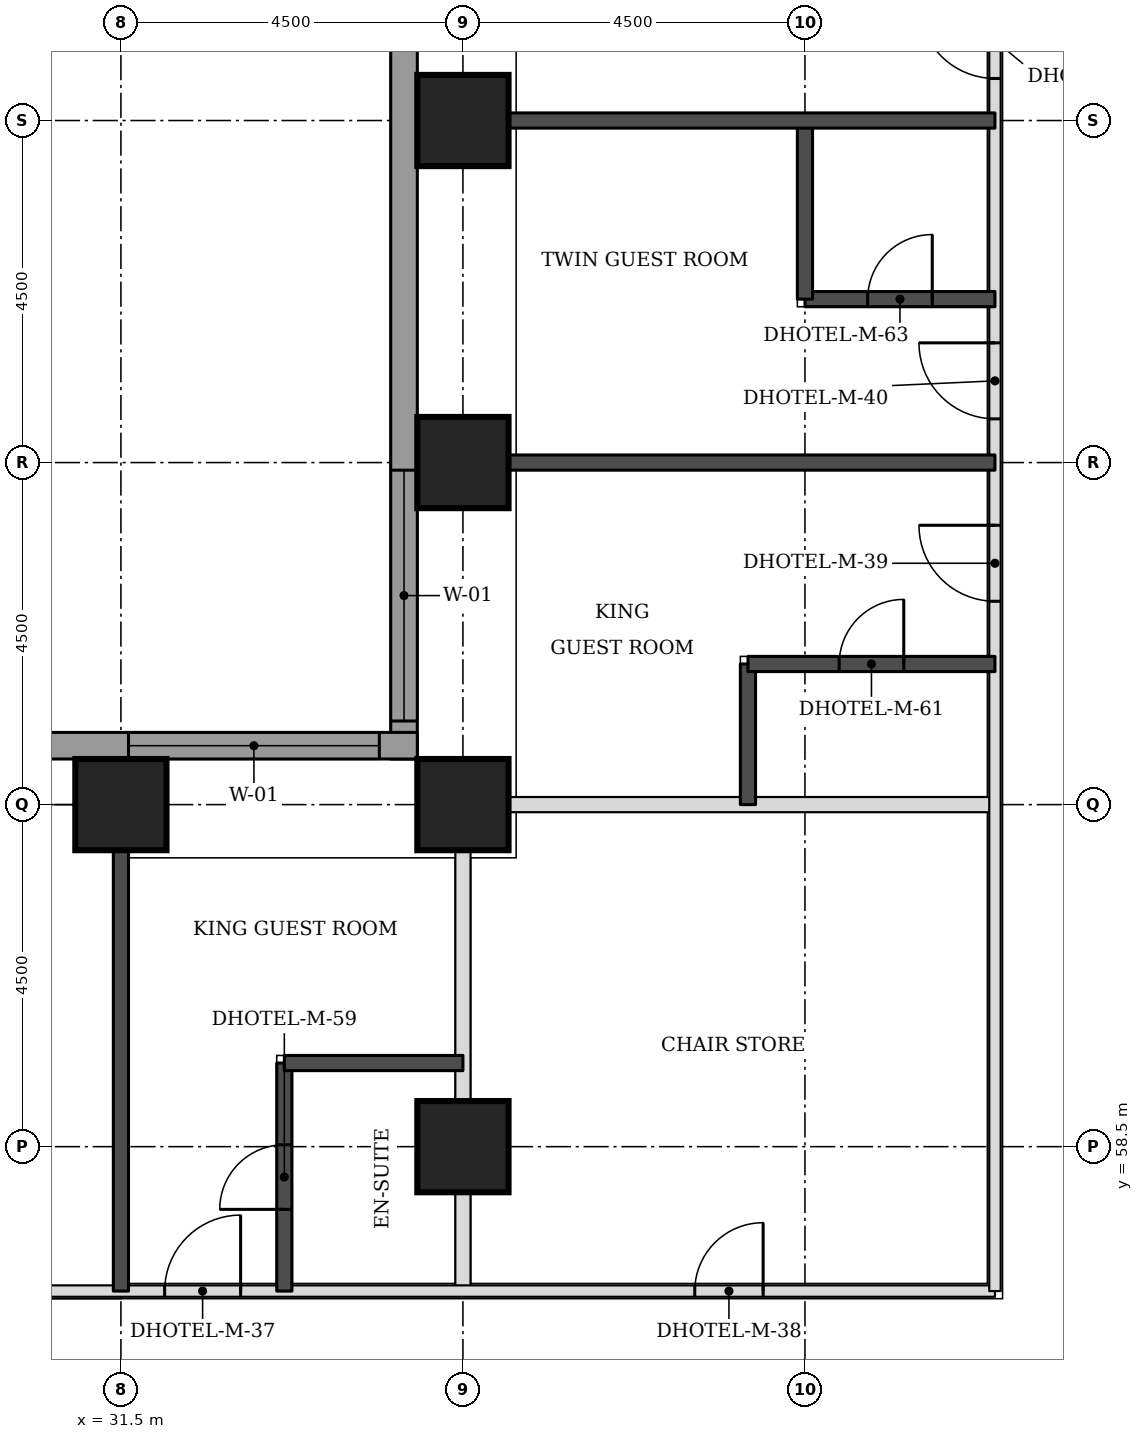
"""IFC4 building model, lengths in metres.
Left out: names, types, materials, properties, quantities, classifications, styles, units other than length and angle.
Written with IfcOpenShell. Run it as: python <this file> out.ifc"""

import sys

from ifc_helpers import new_model, si_unit, direction, frame, frame_2d, origin, origin_2d, place, context, subcontext, project, spatial, rectangle, extrude, element, fill, save


model = new_model("IFC4")
c1 = context("Model", 3, precision=1e-05, world=origin(), true_north=direction((0.0, 1.0)))
c2 = subcontext(c1, "Body", "Model", "MODEL_VIEW")
j1 = project(units=[si_unit("LENGTHUNIT", "METRE"), si_unit("PLANEANGLEUNIT", "RADIAN")], contexts=[c1])
p1 = place(None, origin())
s1 = spatial("IfcSite", under=j1, at=p1, CompositionType="ELEMENT")
p2 = place(p1, origin())
s2 = spatial("IfcBuilding", under=s1, at=p2, CompositionType="ELEMENT")
p3 = place(p2, frame((0.0, 0.0, 23.1)))
s3 = spatial("IfcBuildingStorey", under=s2, at=p3, CompositionType="ELEMENT", Elevation=23.1)
for number, where, z_axis, x_axis in (
    (1, (36.0, 58.5, 0.0), (0.0, 0.0, 1.0), (1.0, 0.0, 0.0)),
    (2, (31.5, 63.0, 0.0), (0.0, 0.0, 1.0), (1.0, 0.0, 0.0)),
    (3, (36.0, 63.0, 0.0), (0.0, 0.0, 1.0), (1.0, 0.0, 0.0)),
    (4, (36.0, 67.5, 0.0), (0.0, 0.0, 1.0), (1.0, 0.0, 0.0)),
    (5, (36.0, 72.0, 0.0), (0.0, 0.0, 1.0), (1.0, 0.0, 0.0)),
):
    element("IfcColumn", number, at=place(p3, frame(where, z_axis=z_axis, x_axis=x_axis)), inside=s3, PredefinedType="COLUMN", context=c2, shape_type="SweptSolid", body=[
        extrude(rectangle(XDim=1.2, YDim=1.2, at=origin_2d()), origin(), (0.0, 0.0, 1.0), 3.3),
    ])
p4 = place(p3, frame((35.225, 76.894, 0.0), z_axis=(0.0, 0.0, 1.0), x_axis=(0.0, -1.0, 0.0)))
e6 = element("IfcWall", 6, at=p4, inside=s3, PredefinedType="STANDARD", context=c2, shape_type="SweptSolid", body=[
    extrude(rectangle(XDim=13.293, YDim=0.35, at=frame_2d((6.647, 0.0))), origin(), (0.0, 0.0, 1.0), 3.055),
])
p5 = place(p4, frame((9.493, 0.0, 0.8)))
e7 = element("IfcOpeningElement", 7, at=p5, cuts=e6, PredefinedType="OPENING", context=c2, shape_type="SweptSolid", body=[
    extrude(rectangle(XDim=3.3, YDim=1.5, at=frame_2d((1.65, 0.75))), frame((0.0, 0.185, 0.0), z_axis=(0.0, -1.0, 0.0), x_axis=(1.0, 0.0, 0.0)), (0.0, 0.0, 1.0), 0.37),
])
p6 = place(p3, frame((35.4, 63.775, 0.0), z_axis=(0.0, 0.0, 1.0), x_axis=(-1.0, 0.0, 0.0)))
e8 = element("IfcWall", 8, at=p6, inside=s3, PredefinedType="STANDARD", context=c2, shape_type="SweptSolid", body=[
    extrude(rectangle(XDim=17.793, YDim=0.35, at=frame_2d((8.897, 0.0))), origin(), (0.0, 0.0, 1.0), 3.055),
])
p7 = place(p6, frame((0.5, 0.0, 0.8)))
e9 = element("IfcOpeningElement", 9, at=p7, cuts=e8, PredefinedType="OPENING", context=c2, shape_type="SweptSolid", body=[
    extrude(rectangle(XDim=3.3, YDim=1.5, at=frame_2d((1.65, 0.75))), frame((0.0, 0.185, 0.0), z_axis=(0.0, -1.0, 0.0), x_axis=(1.0, 0.0, 0.0)), (0.0, 0.0, 1.0), 0.37),
])
p8 = place(p6, frame((9.0, 0.0, 0.8)))
e10 = element("IfcOpeningElement", 10, at=p8, cuts=e8, PredefinedType="OPENING", context=c2, shape_type="SweptSolid", body=[
    extrude(rectangle(XDim=3.3, YDim=1.5, at=frame_2d((1.65, 0.75))), frame((0.0, 0.185, 0.0), z_axis=(0.0, -1.0, 0.0), x_axis=(1.0, 0.0, 0.0)), (0.0, 0.0, 1.0), 0.37),
])
p9 = place(p3, frame((36.0, 56.6, 0.0), z_axis=(0.0, 0.0, 1.0), x_axis=(0.0, 1.0, 0.0)))
e11 = element("IfcWall", 11, at=p9, inside=s3, PredefinedType="PARTITIONING", context=c2, shape_type="SweptSolid", body=[
    extrude(rectangle(XDim=5.8, YDim=0.2, at=frame_2d((2.9, 0.0))), origin(), (0.0, 0.0, 1.0), 2.33),
])
p10 = place(p3, frame((36.6, 63.0, 0.0), z_axis=(0.0, 0.0, 1.0), x_axis=(1.0, 0.0, 0.0)))
e12 = element("IfcWall", 12, at=p10, inside=s3, PredefinedType="PARTITIONING", context=c2, shape_type="SweptSolid", body=[
    extrude(rectangle(XDim=6.4, YDim=0.2, at=frame_2d((3.2, 0.0))), origin(), (0.0, 0.0, 1.0), 3.08),
])
p11 = place(p3, frame((29.38, 56.6, 0.0), z_axis=(0.0, 0.0, 1.0), x_axis=(1.0, 0.0, 0.0)))
e13 = element("IfcWall", 13, at=p11, inside=s3, PredefinedType="PARTITIONING", context=c2, shape_type="SweptSolid", body=[
    extrude(rectangle(XDim=13.62, YDim=0.15, at=frame_2d((6.81, 0.0))), origin(), (0.0, 0.0, 1.0), 3.08),
])
p12 = place(p11, frame((2.695, 0.0, 0.0)))
e14 = element("IfcOpeningElement", 14, at=p12, cuts=e13, PredefinedType="OPENING", context=c2, shape_type="SweptSolid", body=[
    extrude(rectangle(XDim=1.0, YDim=2.1, at=frame_2d((0.5, 1.05))), frame((0.0, 0.085, 0.0), z_axis=(0.0, -1.0, 0.0), x_axis=(1.0, 0.0, 0.0)), (0.0, 0.0, 1.0), 0.17),
])
p13 = place(p11, frame((9.67, 0.0, 0.0)))
e15 = element("IfcOpeningElement", 15, at=p13, cuts=e13, PredefinedType="OPENING", context=c2, shape_type="SweptSolid", body=[
    extrude(rectangle(XDim=0.9, YDim=2.1, at=frame_2d((0.45, 1.05))), frame((0.0, 0.085, 0.0), z_axis=(0.0, -1.0, 0.0), x_axis=(1.0, 0.0, 0.0)), (0.0, 0.0, 1.0), 0.17),
])
p14 = place(p3, frame((43.0, 56.6, 0.0), z_axis=(0.0, 0.0, 1.0), x_axis=(0.0, 1.0, 0.0)))
e16 = element("IfcWall", 16, at=p14, inside=s3, PredefinedType="PARTITIONING", context=c2, shape_type="SweptSolid", body=[
    extrude(rectangle(XDim=17.4, YDim=0.15, at=frame_2d((8.7, 0.0))), origin(), (0.0, 0.0, 1.0), 3.08),
])
p15 = place(p14, frame((9.075, 0.0, 0.0)))
e17 = element("IfcOpeningElement", 17, at=p15, cuts=e16, PredefinedType="OPENING", context=c2, shape_type="SweptSolid", body=[
    extrude(rectangle(XDim=1.0, YDim=2.1, at=frame_2d((0.5, 1.05))), frame((0.0, 0.085, 0.0), z_axis=(0.0, -1.0, 0.0), x_axis=(1.0, 0.0, 0.0)), (0.0, 0.0, 1.0), 0.17),
])
p16 = place(p14, frame((11.475, 0.0, 0.0)))
e18 = element("IfcOpeningElement", 18, at=p16, cuts=e16, PredefinedType="OPENING", context=c2, shape_type="SweptSolid", body=[
    extrude(rectangle(XDim=1.0, YDim=2.1, at=frame_2d((0.5, 1.05))), frame((0.0, 0.085, 0.0), z_axis=(0.0, -1.0, 0.0), x_axis=(1.0, 0.0, 0.0)), (0.0, 0.0, 1.0), 0.17),
])
p17 = place(p14, frame((15.953, 0.0, 0.0)))
e19 = element("IfcOpeningElement", 19, at=p17, cuts=e16, PredefinedType="OPENING", context=c2, shape_type="SweptSolid", body=[
    extrude(rectangle(XDim=1.0, YDim=2.1, at=frame_2d((0.5, 1.05))), frame((0.0, 0.085, 0.0), z_axis=(0.0, -1.0, 0.0), x_axis=(1.0, 0.0, 0.0)), (0.0, 0.0, 1.0), 0.17),
])
p18 = place(p3, frame((31.5, 56.6, 0.0), z_axis=(0.0, 0.0, 1.0), x_axis=(0.0, 1.0, 0.0)))
e20 = element("IfcWall", 20, at=p18, inside=s3, PredefinedType="SOLIDWALL", context=c2, shape_type="SweptSolid", body=[
    extrude(rectangle(XDim=5.8, YDim=0.2, at=frame_2d((2.9, 0.0))), origin(), (0.0, 0.0, 1.0), 3.08),
])
p19 = place(p3, frame((33.65, 56.6, 0.0), z_axis=(0.0, 0.0, 1.0), x_axis=(0.0, 1.0, 0.0)))
e21 = element("IfcWall", 21, at=p19, inside=s3, PredefinedType="SOLIDWALL", context=c2, shape_type="SweptSolid", body=[
    extrude(rectangle(XDim=3.0, YDim=0.2, at=frame_2d((1.5, 0.0))), origin(), (0.0, 0.0, 1.0), 3.08),
])
p20 = place(p19, frame((1.075, 0.0, 0.0)))
e22 = element("IfcOpeningElement", 22, at=p20, cuts=e21, PredefinedType="OPENING", context=c2, shape_type="SweptSolid", body=[
    extrude(rectangle(XDim=0.85, YDim=2.1, at=frame_2d((0.425, 1.05))), frame((0.0, 0.11, 0.0), z_axis=(0.0, -1.0, 0.0), x_axis=(1.0, 0.0, 0.0)), (0.0, 0.0, 1.0), 0.22),
])
p21 = place(p3, frame((33.65, 59.6, 0.0), z_axis=(0.0, 0.0, 1.0), x_axis=(1.0, 0.0, 0.0)))
e23 = element("IfcWall", 23, at=p21, inside=s3, PredefinedType="SOLIDWALL", context=c2, shape_type="SweptSolid", body=[
    extrude(rectangle(XDim=2.35, YDim=0.2, at=frame_2d((1.175, 0.0))), origin(), (0.0, 0.0, 1.0), 3.08),
])
p22 = place(p3, frame((39.75, 63.0, 0.0), z_axis=(0.0, 0.0, 1.0), x_axis=(0.0, 1.0, 0.0)))
e24 = element("IfcWall", 24, at=p22, inside=s3, PredefinedType="SOLIDWALL", context=c2, shape_type="SweptSolid", body=[
    extrude(rectangle(XDim=1.85, YDim=0.2, at=frame_2d((0.925, 0.0))), origin(), (0.0, 0.0, 1.0), 3.08),
])
p23 = place(p3, frame((39.75, 64.85, 0.0), z_axis=(0.0, 0.0, 1.0), x_axis=(1.0, 0.0, 0.0)))
e25 = element("IfcWall", 25, at=p23, inside=s3, PredefinedType="SOLIDWALL", context=c2, shape_type="SweptSolid", body=[
    extrude(rectangle(XDim=3.25, YDim=0.2, at=frame_2d((1.625, 0.0))), origin(), (0.0, 0.0, 1.0), 3.08),
])
p24 = place(p23, frame((1.2, 0.0, 0.0)))
e26 = element("IfcOpeningElement", 26, at=p24, cuts=e25, PredefinedType="OPENING", context=c2, shape_type="SweptSolid", body=[
    extrude(rectangle(XDim=0.85, YDim=2.1, at=frame_2d((0.425, 1.05))), frame((0.0, 0.11, 0.0), z_axis=(0.0, -1.0, 0.0), x_axis=(1.0, 0.0, 0.0)), (0.0, 0.0, 1.0), 0.22),
])
p25 = place(p3, frame((36.6, 67.5, 0.0), z_axis=(0.0, 0.0, 1.0), x_axis=(1.0, 0.0, 0.0)))
e27 = element("IfcWall", 27, at=p25, inside=s3, PredefinedType="SOLIDWALL", context=c2, shape_type="SweptSolid", body=[
    extrude(rectangle(XDim=6.4, YDim=0.2, at=frame_2d((3.2, 0.0))), origin(), (0.0, 0.0, 1.0), 3.08),
])
p26 = place(p3, frame((40.5, 69.65, 0.0), z_axis=(0.0, 0.0, 1.0), x_axis=(1.0, 0.0, 0.0)))
e28 = element("IfcWall", 28, at=p26, inside=s3, PredefinedType="SOLIDWALL", context=c2, shape_type="SweptSolid", body=[
    extrude(rectangle(XDim=2.5, YDim=0.2, at=frame_2d((1.25, 0.0))), origin(), (0.0, 0.0, 1.0), 3.08),
])
p27 = place(p26, frame((0.825, 0.0, 0.0)))
e29 = element("IfcOpeningElement", 29, at=p27, cuts=e28, PredefinedType="OPENING", context=c2, shape_type="SweptSolid", body=[
    extrude(rectangle(XDim=0.85, YDim=2.1, at=frame_2d((0.425, 1.05))), frame((0.0, 0.11, 0.0), z_axis=(0.0, -1.0, 0.0), x_axis=(1.0, 0.0, 0.0)), (0.0, 0.0, 1.0), 0.22),
])
p28 = place(p3, frame((40.5, 69.65, 0.0), z_axis=(0.0, 0.0, 1.0), x_axis=(0.0, 1.0, 0.0)))
e30 = element("IfcWall", 30, at=p28, inside=s3, PredefinedType="SOLIDWALL", context=c2, shape_type="SweptSolid", body=[
    extrude(rectangle(XDim=2.35, YDim=0.2, at=frame_2d((1.175, 0.0))), origin(), (0.0, 0.0, 1.0), 3.08),
])
p29 = place(p3, frame((36.6, 72.0, 0.0), z_axis=(0.0, 0.0, 1.0), x_axis=(1.0, 0.0, 0.0)))
e31 = element("IfcWall", 31, at=p29, inside=s3, PredefinedType="SOLIDWALL", context=c2, shape_type="SweptSolid", body=[
    extrude(rectangle(XDim=6.4, YDim=0.2, at=frame_2d((3.2, 0.0))), origin(), (0.0, 0.0, 1.0), 3.08),
])
p30 = place(p5, origin())
e32 = element("IfcWindow", 32, at=p30, inside=s3, PartitioningType="SINGLE_PANEL", PredefinedType="WINDOW", context=c2, shape_type="SweptSolid", body=[
    extrude(rectangle(XDim=3.3, YDim=1.5, at=frame_2d((1.65, 0.75))), frame((0.0, 0.085, 0.0), z_axis=(0.0, -1.0, 0.0), x_axis=(1.0, 0.0, 0.0)), (0.0, 0.0, 1.0), 0.06),
])
fill(e7, e32)
p31 = place(p7, origin())
e33 = element("IfcWindow", 33, at=p31, inside=s3, PartitioningType="SINGLE_PANEL", PredefinedType="WINDOW", context=c2, shape_type="SweptSolid", body=[
    extrude(rectangle(XDim=3.3, YDim=1.5, at=frame_2d((1.65, 0.75))), frame((0.0, 0.085, 0.0), z_axis=(0.0, -1.0, 0.0), x_axis=(1.0, 0.0, 0.0)), (0.0, 0.0, 1.0), 0.06),
])
fill(e9, e33)
p32 = place(p12, origin())
e34 = element("IfcDoor", 34, at=p32, inside=s3, OperationType="SINGLE_SWING_RIGHT", PredefinedType="DOOR", context=c2, shape_type="SweptSolid", body=[
    extrude(rectangle(XDim=1.0, YDim=2.1, at=frame_2d((0.5, 1.05))), frame((0.0, 0.025, 0.0), z_axis=(0.0, -1.0, 0.0), x_axis=(1.0, 0.0, 0.0)), (0.0, 0.0, 1.0), 0.05),
])
fill(e14, e34)
p33 = place(p20, origin())
e35 = element("IfcDoor", 35, at=p33, inside=s3, OperationType="SINGLE_SWING_LEFT", PredefinedType="DOOR", context=c2, shape_type="SweptSolid", body=[
    extrude(rectangle(XDim=0.85, YDim=2.1, at=frame_2d((0.425, 1.05))), frame((0.0, 0.025, 0.0), z_axis=(0.0, -1.0, 0.0), x_axis=(1.0, 0.0, 0.0)), (0.0, 0.0, 1.0), 0.05),
])
fill(e22, e35)
p34 = place(p15, origin())
e36 = element("IfcDoor", 36, at=p34, inside=s3, OperationType="SINGLE_SWING_RIGHT", PredefinedType="DOOR", context=c2, shape_type="SweptSolid", body=[
    extrude(rectangle(XDim=1.0, YDim=2.1, at=frame_2d((0.5, 1.05))), frame((0.0, 0.025, 0.0), z_axis=(0.0, -1.0, 0.0), x_axis=(1.0, 0.0, 0.0)), (0.0, 0.0, 1.0), 0.05),
])
fill(e17, e36)
p35 = place(p24, origin())
e37 = element("IfcDoor", 37, at=p35, inside=s3, OperationType="SINGLE_SWING_RIGHT", PredefinedType="DOOR", context=c2, shape_type="SweptSolid", body=[
    extrude(rectangle(XDim=0.85, YDim=2.1, at=frame_2d((0.425, 1.05))), frame((0.0, 0.025, 0.0), z_axis=(0.0, -1.0, 0.0), x_axis=(1.0, 0.0, 0.0)), (0.0, 0.0, 1.0), 0.05),
])
fill(e26, e37)
p36 = place(p16, origin())
e38 = element("IfcDoor", 38, at=p36, inside=s3, OperationType="SINGLE_SWING_RIGHT", PredefinedType="DOOR", context=c2, shape_type="SweptSolid", body=[
    extrude(rectangle(XDim=1.0, YDim=2.1, at=frame_2d((0.5, 1.05))), frame((0.0, 0.025, 0.0), z_axis=(0.0, -1.0, 0.0), x_axis=(1.0, 0.0, 0.0)), (0.0, 0.0, 1.0), 0.05),
])
fill(e18, e38)
p37 = place(p27, origin())
e39 = element("IfcDoor", 39, at=p37, inside=s3, OperationType="SINGLE_SWING_RIGHT", PredefinedType="DOOR", context=c2, shape_type="SweptSolid", body=[
    extrude(rectangle(XDim=0.85, YDim=2.1, at=frame_2d((0.425, 1.05))), frame((0.0, 0.025, 0.0), z_axis=(0.0, -1.0, 0.0), x_axis=(1.0, 0.0, 0.0)), (0.0, 0.0, 1.0), 0.05),
])
fill(e29, e39)
p38 = place(p17, origin())
e40 = element("IfcDoor", 40, at=p38, inside=s3, OperationType="SINGLE_SWING_RIGHT", PredefinedType="DOOR", context=c2, shape_type="SweptSolid", body=[
    extrude(rectangle(XDim=1.0, YDim=2.1, at=frame_2d((0.5, 1.05))), frame((0.0, 0.025, 0.0), z_axis=(0.0, -1.0, 0.0), x_axis=(1.0, 0.0, 0.0)), (0.0, 0.0, 1.0), 0.05),
])
fill(e19, e40)
p39 = place(p13, origin())
e41 = element("IfcDoor", 41, at=p39, inside=s3, OperationType="SINGLE_SWING_RIGHT", PredefinedType="DOOR", context=c2, shape_type="SweptSolid", body=[
    extrude(rectangle(XDim=0.9, YDim=2.1, at=frame_2d((0.45, 1.05))), frame((0.0, 0.025, 0.0), z_axis=(0.0, -1.0, 0.0), x_axis=(1.0, 0.0, 0.0)), (0.0, 0.0, 1.0), 0.05),
])
fill(e15, e41)
save(model, sys.argv[1])
